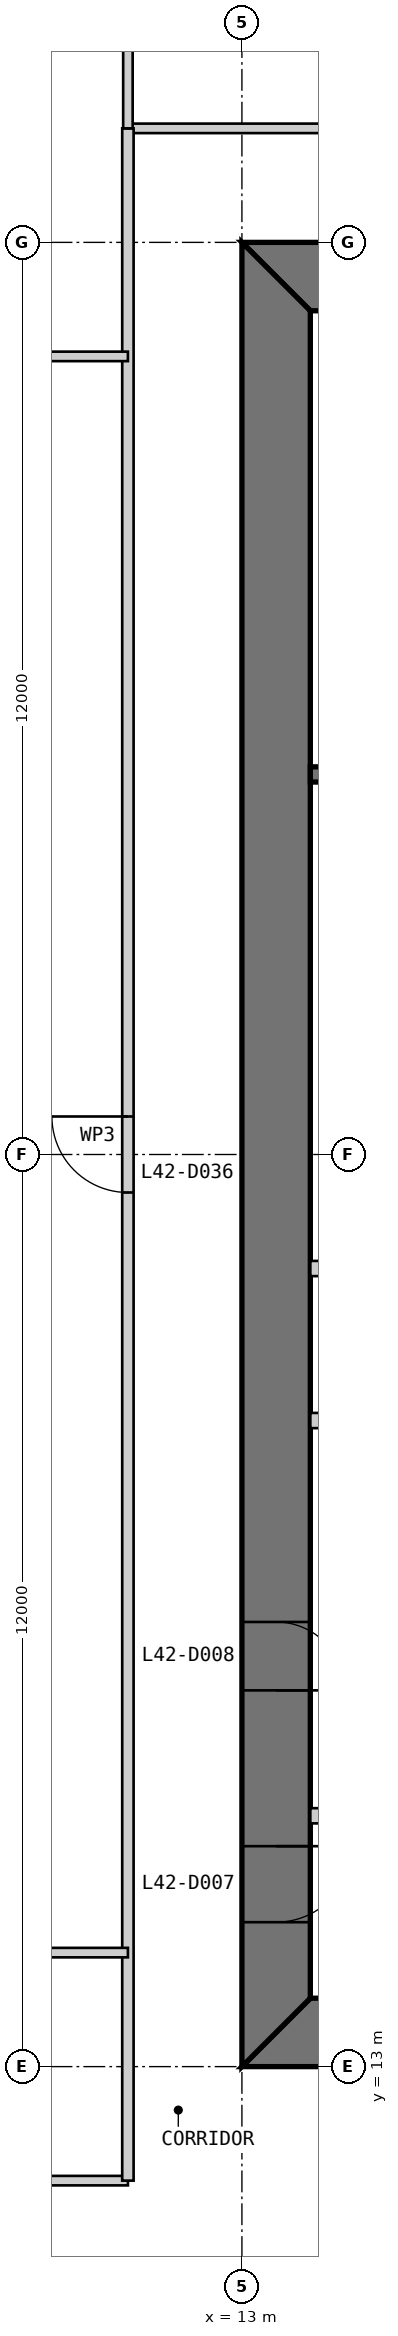
"""IFC4 building model, lengths in metres.
Left out: names, types, materials, properties, quantities, classifications, styles, units other than length and angle.
Written with IfcOpenShell. Run it as: python <this file> out.ifc"""

import sys

from ifc_helpers import new_model, si_unit, direction, frame, frame_2d, origin, place, context, subcontext, project, spatial, polyline, rectangle, outline, extrude, element, fill, save


model = new_model("IFC4")
c1 = context("Model", 3, precision=1e-05, world=origin(), true_north=direction((0.0, 1.0)))
c2 = subcontext(c1, "Body", "Model", "MODEL_VIEW")
j1 = project(units=[si_unit("LENGTHUNIT", "METRE"), si_unit("PLANEANGLEUNIT", "RADIAN")], contexts=[c1])
p1 = place(None, origin())
s1 = spatial("IfcSite", under=j1, at=p1, CompositionType="ELEMENT")
p2 = place(p1, origin())
s2 = spatial("IfcBuilding", under=s1, at=p2, CompositionType="ELEMENT")
p3 = place(p2, frame((0.0, 0.0, 181.8)))
s3 = spatial("IfcBuildingStorey", under=s2, at=p3, CompositionType="ELEMENT", Elevation=181.8)
p4 = place(p3, frame((13.0, 13.45, 0.0), z_axis=(0.0, 0.0, 1.0), x_axis=(1.0, 0.0, 0.0)))
e1 = element("IfcWall", 1, at=p4, inside=s3, PredefinedType="SHEAR", context=c2, shape_type="SweptSolid", body=[
    extrude(outline(polyline([(0.0, -0.45), (24.0, -0.45), (23.1, 0.45), (0.9, 0.45), (0.0, -0.45)])), origin(), (0.0, 0.0, 1.0), 4.0),
])
p5 = place(p4, frame((4.9, 0.0, 0.0)))
e2 = element("IfcOpeningElement", 2, at=p5, cuts=e1, PredefinedType="OPENING", context=c2, shape_type="SweptSolid", body=[
    extrude(rectangle(XDim=1.0, YDim=2.2, at=frame_2d((0.5, 1.1))), frame((0.0, 0.46, 0.0), z_axis=(0.0, -1.0, 0.0), x_axis=(1.0, 0.0, 0.0)), (0.0, 0.0, 1.0), 0.92),
])
p6 = place(p4, frame((8.9, 0.0, 0.0)))
e3 = element("IfcOpeningElement", 3, at=p6, cuts=e1, PredefinedType="OPENING", context=c2, shape_type="SweptSolid", body=[
    extrude(rectangle(XDim=1.1, YDim=2.2, at=frame_2d((0.55, 1.1))), frame((0.0, 0.46, 0.0), z_axis=(0.0, -1.0, 0.0), x_axis=(1.0, 0.0, 0.0)), (0.0, 0.0, 1.0), 0.92),
])
p7 = place(p4, frame((15.05, 0.0, 0.0)))
e4 = element("IfcOpeningElement", 4, at=p7, cuts=e1, PredefinedType="OPENING", context=c2, shape_type="SweptSolid", body=[
    extrude(rectangle(XDim=0.9, YDim=2.2, at=frame_2d((0.45, 1.1))), frame((0.0, 0.46, 0.0), z_axis=(0.0, -1.0, 0.0), x_axis=(1.0, 0.0, 0.0)), (0.0, 0.0, 1.0), 0.92),
])
p8 = place(p4, frame((17.9, 0.0, 0.0)))
e5 = element("IfcOpeningElement", 5, at=p8, cuts=e1, PredefinedType="OPENING", context=c2, shape_type="SweptSolid", body=[
    extrude(rectangle(XDim=1.0, YDim=2.2, at=frame_2d((0.5, 1.1))), frame((0.0, 0.46, 0.0), z_axis=(0.0, -1.0, 0.0), x_axis=(1.0, 0.0, 0.0)), (0.0, 0.0, 1.0), 0.92),
])
p9 = place(p4, frame((21.4, 0.0, 0.0)))
e6 = element("IfcOpeningElement", 6, at=p9, cuts=e1, PredefinedType="OPENING", context=c2, shape_type="SweptSolid", body=[
    extrude(rectangle(XDim=1.0, YDim=2.2, at=frame_2d((0.5, 1.1))), frame((0.0, 0.46, 0.0), z_axis=(0.0, -1.0, 0.0), x_axis=(1.0, 0.0, 0.0)), (0.0, 0.0, 1.0), 0.92),
])
p10 = place(p3, frame((37.0, 36.55, 0.0), z_axis=(0.0, 0.0, 1.0), x_axis=(-1.0, 0.0, 0.0)))
e7 = element("IfcWall", 7, at=p10, inside=s3, PredefinedType="SHEAR", context=c2, shape_type="SweptSolid", body=[
    extrude(outline(polyline([(0.0, -0.45), (24.0, -0.45), (23.1, 0.45), (0.9, 0.45), (0.0, -0.45)])), origin(), (0.0, 0.0, 1.0), 4.0),
])
p11 = place(p10, frame((4.9, 0.0, 0.0)))
e8 = element("IfcOpeningElement", 8, at=p11, cuts=e7, PredefinedType="OPENING", context=c2, shape_type="SweptSolid", body=[
    extrude(rectangle(XDim=1.0, YDim=2.2, at=frame_2d((0.5, 1.1))), frame((0.0, 0.46, 0.0), z_axis=(0.0, -1.0, 0.0), x_axis=(1.0, 0.0, 0.0)), (0.0, 0.0, 1.0), 0.92),
])
p12 = place(p10, frame((8.9, 0.0, 0.0)))
e9 = element("IfcOpeningElement", 9, at=p12, cuts=e7, PredefinedType="OPENING", context=c2, shape_type="SweptSolid", body=[
    extrude(rectangle(XDim=1.1, YDim=2.2, at=frame_2d((0.55, 1.1))), frame((0.0, 0.46, 0.0), z_axis=(0.0, -1.0, 0.0), x_axis=(1.0, 0.0, 0.0)), (0.0, 0.0, 1.0), 0.92),
])
p13 = place(p10, frame((15.05, 0.0, 0.0)))
e10 = element("IfcOpeningElement", 10, at=p13, cuts=e7, PredefinedType="OPENING", context=c2, shape_type="SweptSolid", body=[
    extrude(rectangle(XDim=0.9, YDim=2.2, at=frame_2d((0.45, 1.1))), frame((0.0, 0.46, 0.0), z_axis=(0.0, -1.0, 0.0), x_axis=(1.0, 0.0, 0.0)), (0.0, 0.0, 1.0), 0.92),
])
p14 = place(p10, frame((17.9, 0.0, 0.0)))
e11 = element("IfcOpeningElement", 11, at=p14, cuts=e7, PredefinedType="OPENING", context=c2, shape_type="SweptSolid", body=[
    extrude(rectangle(XDim=1.0, YDim=2.2, at=frame_2d((0.5, 1.1))), frame((0.0, 0.46, 0.0), z_axis=(0.0, -1.0, 0.0), x_axis=(1.0, 0.0, 0.0)), (0.0, 0.0, 1.0), 0.92),
])
p15 = place(p10, frame((21.4, 0.0, 0.0)))
e12 = element("IfcOpeningElement", 12, at=p15, cuts=e7, PredefinedType="OPENING", context=c2, shape_type="SweptSolid", body=[
    extrude(rectangle(XDim=1.0, YDim=2.2, at=frame_2d((0.5, 1.1))), frame((0.0, 0.46, 0.0), z_axis=(0.0, -1.0, 0.0), x_axis=(1.0, 0.0, 0.0)), (0.0, 0.0, 1.0), 0.92),
])
p16 = place(p3, frame((13.45, 36.1, 0.0), z_axis=(0.0, 0.0, 1.0), x_axis=(0.0, -1.0, 0.0)))
e13 = element("IfcWall", 13, at=p16, inside=s3, PredefinedType="SHEAR", context=c2, shape_type="SweptSolid", body=[
    extrude(outline(polyline([(-0.9, -0.45), (23.1, -0.45), (22.2, 0.45), (0.0, 0.45), (-0.9, -0.45)])), origin(), (0.0, 0.0, 1.0), 4.0),
])
p17 = place(p16, frame((20.2, 0.0, 0.0)))
e14 = element("IfcOpeningElement", 14, at=p17, cuts=e13, PredefinedType="OPENING", context=c2, shape_type="SweptSolid", body=[
    extrude(rectangle(XDim=1.0, YDim=2.2, at=frame_2d((0.5, 1.1))), frame((0.0, 0.46, 0.0), z_axis=(0.0, -1.0, 0.0), x_axis=(1.0, 0.0, 0.0)), (0.0, 0.0, 1.0), 0.92),
])
p18 = place(p16, frame((17.25, 0.0, 0.0)))
e15 = element("IfcOpeningElement", 15, at=p18, cuts=e13, PredefinedType="OPENING", context=c2, shape_type="SweptSolid", body=[
    extrude(rectangle(XDim=0.9, YDim=2.2, at=frame_2d((0.45, 1.1))), frame((0.0, 0.46, 0.0), z_axis=(0.0, -1.0, 0.0), x_axis=(1.0, 0.0, 0.0)), (0.0, 0.0, 1.0), 0.92),
])
for number, where, z_axis, x_axis in (
    (16, (13.9, 16.3, 0.0), (0.0, 0.0, 1.0), (1.0, 0.0, 0.0)),
    (17, (13.9, 21.5, 0.0), (0.0, 0.0, 1.0), (1.0, 0.0, 0.0)),
    (18, (13.9, 23.5, 0.0), (0.0, 0.0, 1.0), (1.0, 0.0, 0.0)),
):
    element("IfcWall", number, at=place(p3, frame(where, z_axis=z_axis, x_axis=x_axis)), inside=s3, PredefinedType="PARTITIONING", context=c2, shape_type="SweptSolid", body=[
        extrude(rectangle(XDim=2.8, YDim=0.2, at=frame_2d((1.4, 0.0))), origin(), (0.0, 0.0, 1.0), 3.8),
    ])
p19 = place(p3, frame((29.7, 30.0, 0.0), z_axis=(0.0, 0.0, 1.0), x_axis=(-1.0, 0.0, 0.0)))
e19 = element("IfcWall", 19, at=p19, inside=s3, PredefinedType="SOLIDWALL", context=c2, shape_type="SweptSolid", body=[
    extrude(rectangle(XDim=15.8, YDim=0.2, at=frame_2d((7.9, 0.0))), origin(), (0.0, 0.0, 1.0), 3.8),
])
p20 = place(p3, frame((0.15, 11.5, 0.0), z_axis=(0.0, 0.0, 1.0), x_axis=(1.0, 0.0, 0.0)))
e20 = element("IfcWall", 20, at=p20, inside=s3, PredefinedType="PARTITIONING", context=c2, shape_type="SweptSolid", body=[
    extrude(rectangle(XDim=11.35, YDim=0.125, at=frame_2d((5.675, 0.0))), origin(), (0.0, 0.0, 1.0), 3.85),
])
p21 = place(p3, frame((14.5, 38.5, 0.0), z_axis=(0.0, 0.0, 1.0), x_axis=(-1.0, 0.0, 0.0)))
e21 = element("IfcWall", 21, at=p21, inside=s3, PredefinedType="PARTITIONING", context=c2, shape_type="SweptSolid", body=[
    extrude(rectangle(XDim=3.0, YDim=0.125, at=frame_2d((1.5, 0.0))), origin(), (0.0, 0.0, 1.0), 3.85),
])
p22 = place(p3, frame((11.5, 38.5, 0.0), z_axis=(0.0, 0.0, 1.0), x_axis=(0.0, -1.0, 0.0)))
e22 = element("IfcWall", 22, at=p22, inside=s3, PredefinedType="PARTITIONING", context=c2, shape_type="SweptSolid", body=[
    extrude(rectangle(XDim=27.0, YDim=0.15, at=frame_2d((13.5, 0.0))), origin(), (0.0, 0.0, 1.0), 3.85),
])
p23 = place(p22, frame((13.0, 0.0, 0.0)))
e23 = element("IfcOpeningElement", 23, at=p23, cuts=e22, PredefinedType="OPENING", context=c2, shape_type="SweptSolid", body=[
    extrude(rectangle(XDim=1.0, YDim=2.2, at=frame_2d((0.5, 1.1))), frame((0.0, 0.085, 0.0), z_axis=(0.0, -1.0, 0.0), x_axis=(1.0, 0.0, 0.0)), (0.0, 0.0, 1.0), 0.17),
])
p24 = place(p3, frame((11.5, 49.85, 0.0), z_axis=(0.0, 0.0, 1.0), x_axis=(0.0, -1.0, 0.0)))
e24 = element("IfcWall", 24, at=p24, inside=s3, PredefinedType="PARTITIONING", context=c2, shape_type="SweptSolid", body=[
    extrude(rectangle(XDim=11.35, YDim=0.125, at=frame_2d((5.675, 0.0))), origin(), (0.0, 0.0, 1.0), 3.85),
])
p25 = place(p3, frame((0.15, 35.5, 0.0), z_axis=(0.0, 0.0, 1.0), x_axis=(1.0, 0.0, 0.0)))
e25 = element("IfcWall", 25, at=p25, inside=s3, PredefinedType="PARTITIONING", context=c2, shape_type="SweptSolid", body=[
    extrude(rectangle(XDim=11.35, YDim=0.125, at=frame_2d((5.675, 0.0))), origin(), (0.0, 0.0, 1.0), 3.85),
])
p26 = place(p25, frame((7.1, 0.0, 0.0)))
e26 = element("IfcOpeningElement", 26, at=p26, cuts=e25, PredefinedType="OPENING", context=c2, shape_type="SweptSolid", body=[
    extrude(rectangle(XDim=1.0, YDim=2.2, at=frame_2d((0.5, 1.1))), frame((0.0, 0.073, 0.0), z_axis=(0.0, -1.0, 0.0), x_axis=(1.0, 0.0, 0.0)), (0.0, 0.0, 1.0), 0.145),
])
p27 = place(p3, frame((4.0, 14.5, 0.0), z_axis=(0.0, 0.0, 1.0), x_axis=(1.0, 0.0, 0.0)))
e27 = element("IfcWall", 27, at=p27, inside=s3, PredefinedType="PARTITIONING", context=c2, shape_type="SweptSolid", body=[
    extrude(rectangle(XDim=7.5, YDim=0.125, at=frame_2d((3.75, 0.0))), origin(), (0.0, 0.0, 1.0), 3.85),
])
p28 = place(p27, frame((3.3, 0.0, 0.0)))
e28 = element("IfcOpeningElement", 28, at=p28, cuts=e27, PredefinedType="OPENING", context=c2, shape_type="SweptSolid", body=[
    extrude(rectangle(XDim=0.9, YDim=2.2, at=frame_2d((0.45, 1.1))), frame((0.0, 0.073, 0.0), z_axis=(0.0, -1.0, 0.0), x_axis=(1.0, 0.0, 0.0)), (0.0, 0.0, 1.0), 0.145),
])
p29 = place(p17, origin())
e29 = element("IfcDoor", 29, at=p29, inside=s3, OperationType="SINGLE_SWING_LEFT", PredefinedType="DOOR", context=c2, shape_type="SweptSolid", body=[
    extrude(rectangle(XDim=1.0, YDim=2.2, at=frame_2d((0.5, 1.1))), frame((0.0, 0.025, 0.0), z_axis=(0.0, -1.0, 0.0), x_axis=(1.0, 0.0, 0.0)), (0.0, 0.0, 1.0), 0.05),
    extrude(outline(polyline([(0.0, 0.0), (0.04, 0.0), (0.04, 2.16), (0.96, 2.16), (0.96, 0.0), (1.0, 0.0), (1.0, 2.2), (0.0, 2.2), (0.0, 0.0)])), frame((0.0, 0.3, 0.0), z_axis=(0.0, -1.0, 0.0), x_axis=(1.0, 0.0, 0.0)), (0.0, 0.0, 1.0), 0.6),
])
fill(e14, e29)
p30 = place(p18, origin())
e30 = element("IfcDoor", 30, at=p30, inside=s3, OperationType="SINGLE_SWING_RIGHT", PredefinedType="DOOR", context=c2, shape_type="SweptSolid", body=[
    extrude(rectangle(XDim=0.9, YDim=2.2, at=frame_2d((0.45, 1.1))), frame((0.0, 0.025, 0.0), z_axis=(0.0, -1.0, 0.0), x_axis=(1.0, 0.0, 0.0)), (0.0, 0.0, 1.0), 0.05),
    extrude(outline(polyline([(0.0, 0.0), (0.04, 0.0), (0.04, 2.16), (0.86, 2.16), (0.86, 0.0), (0.9, 0.0), (0.9, 2.2), (0.0, 2.2), (0.0, 0.0)])), frame((0.0, 0.3, 0.0), z_axis=(0.0, -1.0, 0.0), x_axis=(1.0, 0.0, 0.0)), (0.0, 0.0, 1.0), 0.6),
])
fill(e15, e30)
p31 = place(p23, frame((1.0, 0.0, 0.0), z_axis=(0.0, 0.0, 1.0), x_axis=(-1.0, 0.0, 0.0)))
e31 = element("IfcDoor", 31, at=p31, inside=s3, OperationType="SINGLE_SWING_RIGHT", PredefinedType="DOOR", context=c2, shape_type="SweptSolid", body=[
    extrude(rectangle(XDim=1.0, YDim=2.2, at=frame_2d((0.5, 1.1))), frame((0.0, 0.025, 0.0), z_axis=(0.0, -1.0, 0.0), x_axis=(1.0, 0.0, 0.0)), (0.0, 0.0, 1.0), 0.05),
])
fill(e23, e31)
save(model, sys.argv[1])
